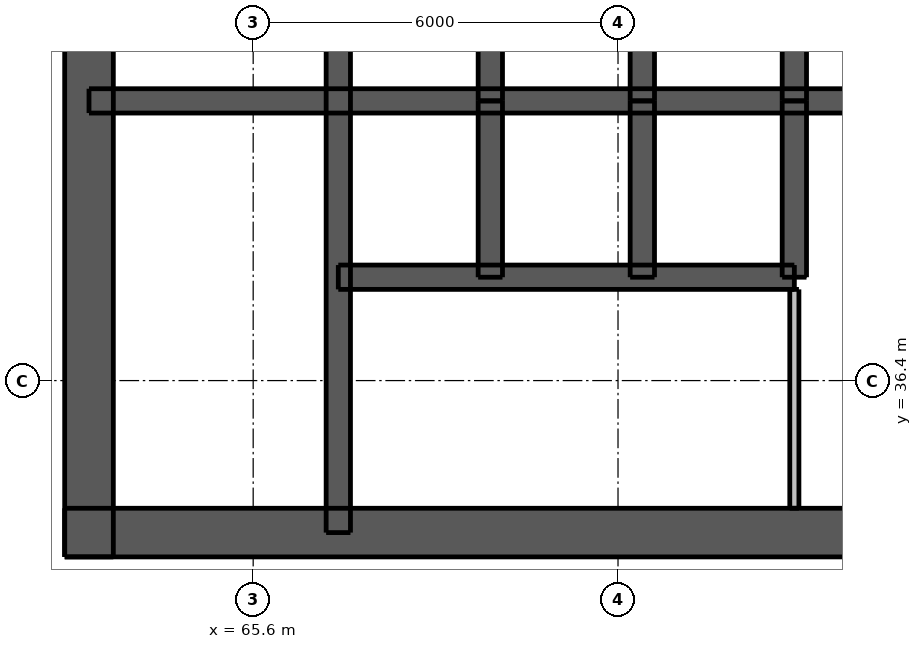
"""IFC4 building model, lengths in metres.
Left out: names, types, materials, properties, quantities, classifications, styles, units other than length and angle.
Written with IfcOpenShell. Run it as: python <this file> out.ifc"""

import sys

from ifc_helpers import new_model, si_unit, direction, frame, frame_2d, origin, place, context, subcontext, project, spatial, rectangle, extrude, element, fill, save


model = new_model("IFC4")
c1 = context("Model", 3, precision=1e-05, world=origin(), true_north=direction((0.0, 1.0)))
c2 = subcontext(c1, "Body", "Model", "MODEL_VIEW")
j1 = project(units=[si_unit("LENGTHUNIT", "METRE"), si_unit("PLANEANGLEUNIT", "RADIAN")], contexts=[c1])
p1 = place(None, origin())
s1 = spatial("IfcSite", under=j1, at=p1, CompositionType="ELEMENT")
p2 = place(p1, origin())
s2 = spatial("IfcBuilding", under=s1, at=p2, CompositionType="ELEMENT")
p3 = place(p2, frame((0.0, 0.0, 98.5)))
s3 = spatial("IfcBuildingStorey", under=s2, at=p3, CompositionType="ELEMENT", Elevation=98.5)
p4 = place(p3, frame((62.5, 33.9, 0.0), z_axis=(0.0, 0.0, 1.0), x_axis=(1.0, 0.0, 0.0)))
e1 = element("IfcWall", 1, at=p4, inside=s3, PredefinedType="SHEAR", context=c2, shape_type="SweptSolid", body=[
    extrude(rectangle(XDim=24.0, YDim=0.8, at=frame_2d((12.0, 0.0))), origin(), (0.0, 0.0, 1.0), 3.05),
])
p5 = place(p4, frame((2.0, 0.0, 0.0)))
e2 = element("IfcOpeningElement", 2, at=p5, cuts=e1, PredefinedType="OPENING", context=c2, shape_type="SweptSolid", body=[
    extrude(rectangle(XDim=1.1, YDim=2.1, at=frame_2d((0.55, 1.05))), frame((0.0, 0.41, 0.0), z_axis=(0.0, -1.0, 0.0), x_axis=(1.0, 0.0, 0.0)), (0.0, 0.0, 1.0), 0.82),
])
p6 = place(p4, frame((20.9, 0.0, 0.0)))
e3 = element("IfcOpeningElement", 3, at=p6, cuts=e1, PredefinedType="OPENING", context=c2, shape_type="SweptSolid", body=[
    extrude(rectangle(XDim=1.1, YDim=2.1, at=frame_2d((0.55, 1.05))), frame((0.0, 0.41, 0.0), z_axis=(0.0, -1.0, 0.0), x_axis=(1.0, 0.0, 0.0)), (0.0, 0.0, 1.0), 0.82),
])
p7 = place(p4, frame((8.0, 0.0, 0.0)))
e4 = element("IfcOpeningElement", 4, at=p7, cuts=e1, PredefinedType="OPENING", context=c2, shape_type="SweptSolid", body=[
    extrude(rectangle(XDim=1.1, YDim=2.1, at=frame_2d((0.55, 1.05))), frame((0.0, 0.41, 0.0), z_axis=(0.0, -1.0, 0.0), x_axis=(1.0, 0.0, 0.0)), (0.0, 0.0, 1.0), 0.82),
])
p8 = place(p4, frame((15.3, 0.0, 0.0)))
e5 = element("IfcOpeningElement", 5, at=p8, cuts=e1, PredefinedType="OPENING", context=c2, shape_type="SweptSolid", body=[
    extrude(rectangle(XDim=0.9, YDim=2.1, at=frame_2d((0.45, 1.05))), frame((0.0, 0.41, 0.0), z_axis=(0.0, -1.0, 0.0), x_axis=(1.0, 0.0, 0.0)), (0.0, 0.0, 1.0), 0.82),
])
p9 = place(p3, frame((62.9, 33.5, 0.0), z_axis=(0.0, 0.0, 1.0), x_axis=(0.0, 1.0, 0.0)))
e6 = element("IfcWall", 6, at=p9, inside=s3, PredefinedType="SHEAR", context=c2, shape_type="SweptSolid", body=[
    extrude(rectangle(XDim=24.0, YDim=0.8, at=frame_2d((12.0, 0.0))), origin(), (0.0, 0.0, 1.0), 3.05),
])
p10 = place(p9, frame((11.2, 0.0, 0.0)))
e7 = element("IfcOpeningElement", 7, at=p10, cuts=e6, PredefinedType="OPENING", context=c2, shape_type="SweptSolid", body=[
    extrude(rectangle(XDim=1.6, YDim=2.1, at=frame_2d((0.8, 1.05))), frame((0.0, 0.41, 0.0), z_axis=(0.0, -1.0, 0.0), x_axis=(1.0, 0.0, 0.0)), (0.0, 0.0, 1.0), 0.82),
])
p11 = place(p3, frame((62.9, 41.0, 0.0), z_axis=(0.0, 0.0, 1.0), x_axis=(1.0, 0.0, 0.0)))
e8 = element("IfcWall", 8, at=p11, inside=s3, PredefinedType="SHEAR", context=c2, shape_type="SweptSolid", body=[
    extrude(rectangle(XDim=23.2, YDim=0.4, at=frame_2d((11.6, 0.0))), origin(), (0.0, 0.0, 1.0), 3.05),
])
p12 = place(p3, frame((67.0, 33.9, 0.0), z_axis=(0.0, 0.0, 1.0), x_axis=(0.0, 1.0, 0.0)))
e9 = element("IfcWall", 9, at=p12, inside=s3, PredefinedType="SHEAR", context=c2, shape_type="SweptSolid", body=[
    extrude(rectangle(XDim=10.0, YDim=0.4, at=frame_2d((5.0, 0.0))), origin(), (0.0, 0.0, 1.0), 3.05),
])
p13 = place(p12, frame((0.6, 0.0, 0.0)))
e10 = element("IfcOpeningElement", 10, at=p13, cuts=e9, PredefinedType="OPENING", context=c2, shape_type="SweptSolid", body=[
    extrude(rectangle(XDim=1.1, YDim=2.1, at=frame_2d((0.55, 1.05))), frame((0.0, 0.21, 0.0), z_axis=(0.0, -1.0, 0.0), x_axis=(1.0, 0.0, 0.0)), (0.0, 0.0, 1.0), 0.42),
])
for number, where, z_axis, x_axis in (
    (11, (69.5, 41.0, 0.0), (0.0, 0.0, 1.0), (0.0, 1.0, 0.0)),
    (12, (72.0, 41.0, 0.0), (0.0, 0.0, 1.0), (0.0, 1.0, 0.0)),
    (13, (74.5, 41.0, 0.0), (0.0, 0.0, 1.0), (0.0, 1.0, 0.0)),
):
    element("IfcWall", number, at=place(p3, frame(where, z_axis=z_axis, x_axis=x_axis)), inside=s3, PredefinedType="SHEAR", context=c2, shape_type="SweptSolid", body=[
        extrude(rectangle(XDim=2.9, YDim=0.4, at=frame_2d((1.45, 0.0))), origin(), (0.0, 0.0, 1.0), 3.05),
    ])
p14 = place(p3, frame((67.0, 38.1, 0.0), z_axis=(0.0, 0.0, 1.0), x_axis=(1.0, 0.0, 0.0)))
e14 = element("IfcWall", 14, at=p14, inside=s3, PredefinedType="SHEAR", context=c2, shape_type="SweptSolid", body=[
    extrude(rectangle(XDim=7.5, YDim=0.4, at=frame_2d((3.75, 0.0))), origin(), (0.0, 0.0, 1.0), 3.05),
])
p15 = place(p14, frame((0.7, 0.0, 0.0)))
e15 = element("IfcOpeningElement", 15, at=p15, cuts=e14, PredefinedType="OPENING", context=c2, shape_type="SweptSolid", body=[
    extrude(rectangle(XDim=1.1, YDim=2.1, at=frame_2d((0.55, 1.05))), frame((0.0, 0.21, 0.0), z_axis=(0.0, -1.0, 0.0), x_axis=(1.0, 0.0, 0.0)), (0.0, 0.0, 1.0), 0.42),
])
p16 = place(p14, frame((3.2, 0.0, 0.0)))
e16 = element("IfcOpeningElement", 16, at=p16, cuts=e14, PredefinedType="OPENING", context=c2, shape_type="SweptSolid", body=[
    extrude(rectangle(XDim=1.1, YDim=2.1, at=frame_2d((0.55, 1.05))), frame((0.0, 0.21, 0.0), z_axis=(0.0, -1.0, 0.0), x_axis=(1.0, 0.0, 0.0)), (0.0, 0.0, 1.0), 0.42),
])
p17 = place(p14, frame((5.65, 0.0, 0.0)))
e17 = element("IfcOpeningElement", 17, at=p17, cuts=e14, PredefinedType="OPENING", context=c2, shape_type="SweptSolid", body=[
    extrude(rectangle(XDim=1.2, YDim=2.1, at=frame_2d((0.6, 1.05))), frame((0.0, 0.21, 0.0), z_axis=(0.0, -1.0, 0.0), x_axis=(1.0, 0.0, 0.0)), (0.0, 0.0, 1.0), 0.42),
])
for number, where, z_axis, x_axis in (
    (18, (69.5, 38.1, 0.0), (0.0, 0.0, 1.0), (0.0, 1.0, 0.0)),
    (19, (72.0, 38.1, 0.0), (0.0, 0.0, 1.0), (0.0, 1.0, 0.0)),
    (20, (74.5, 38.1, 0.0), (0.0, 0.0, 1.0), (0.0, 1.0, 0.0)),
):
    element("IfcWall", number, at=place(p3, frame(where, z_axis=z_axis, x_axis=x_axis)), inside=s3, PredefinedType="SHEAR", context=c2, shape_type="SweptSolid", body=[
        extrude(rectangle(XDim=2.9, YDim=0.4, at=frame_2d((1.45, 0.0))), origin(), (0.0, 0.0, 1.0), 3.05),
    ])
p18 = place(p3, frame((74.5, 34.3, 0.0), z_axis=(0.0, 0.0, 1.0), x_axis=(0.0, 1.0, 0.0)))
e21 = element("IfcWall", 21, at=p18, inside=s3, PredefinedType="PLUMBINGWALL", context=c2, shape_type="SweptSolid", body=[
    extrude(rectangle(XDim=3.6, YDim=0.15, at=frame_2d((1.8, 0.0))), origin(), (0.0, 0.0, 1.0), 3.05),
])
p19 = place(p5, origin())
e22 = element("IfcDoor", 22, at=p19, inside=s3, OperationType="SINGLE_SWING_LEFT", PredefinedType="DOOR", context=c2, shape_type="SweptSolid", body=[
    extrude(rectangle(XDim=1.1, YDim=2.1, at=frame_2d((0.55, 1.05))), frame((0.0, 0.388, 0.0), z_axis=(0.0, -1.0, 0.0), x_axis=(1.0, 0.0, 0.0)), (0.0, 0.0, 1.0), 0.05),
])
fill(e2, e22)
p20 = place(p7, origin())
e23 = element("IfcDoor", 23, at=p20, inside=s3, OperationType="SINGLE_SWING_LEFT", PredefinedType="DOOR", context=c2, shape_type="SweptSolid", body=[
    extrude(rectangle(XDim=1.1, YDim=2.1, at=frame_2d((0.55, 1.05))), frame((0.0, 0.388, 0.0), z_axis=(0.0, -1.0, 0.0), x_axis=(1.0, 0.0, 0.0)), (0.0, 0.0, 1.0), 0.05),
])
fill(e4, e23)
p21 = place(p13, origin())
e24 = element("IfcDoor", 24, at=p21, inside=s3, OperationType="SINGLE_SWING_RIGHT", PredefinedType="DOOR", context=c2, shape_type="SweptSolid", body=[
    extrude(rectangle(XDim=1.1, YDim=2.1, at=frame_2d((0.55, 1.05))), frame((0.0, -0.138, 0.0), z_axis=(0.0, -1.0, 0.0), x_axis=(1.0, 0.0, 0.0)), (0.0, 0.0, 1.0), 0.05),
])
fill(e10, e24)
p22 = place(p15, origin())
e25 = element("IfcDoor", 25, at=p22, inside=s3, OperationType="DOUBLE_DOOR_SLIDING", PredefinedType="DOOR", context=c2, shape_type="SweptSolid", body=[
    extrude(rectangle(XDim=1.1, YDim=2.1, at=frame_2d((0.55, 1.05))), frame((0.0, 0.025, 0.0), z_axis=(0.0, -1.0, 0.0), x_axis=(1.0, 0.0, 0.0)), (0.0, 0.0, 1.0), 0.05),
])
fill(e15, e25)
p23 = place(p16, origin())
e26 = element("IfcDoor", 26, at=p23, inside=s3, OperationType="DOUBLE_DOOR_SLIDING", PredefinedType="DOOR", context=c2, shape_type="SweptSolid", body=[
    extrude(rectangle(XDim=1.1, YDim=2.1, at=frame_2d((0.55, 1.05))), frame((0.0, 0.025, 0.0), z_axis=(0.0, -1.0, 0.0), x_axis=(1.0, 0.0, 0.0)), (0.0, 0.0, 1.0), 0.05),
])
fill(e16, e26)
p24 = place(p17, origin())
e27 = element("IfcDoor", 27, at=p24, inside=s3, OperationType="DOUBLE_DOOR_SLIDING", PredefinedType="DOOR", context=c2, shape_type="SweptSolid", body=[
    extrude(rectangle(XDim=1.2, YDim=2.1, at=frame_2d((0.6, 1.05))), frame((0.0, 0.025, 0.0), z_axis=(0.0, -1.0, 0.0), x_axis=(1.0, 0.0, 0.0)), (0.0, 0.0, 1.0), 0.05),
])
fill(e17, e27)
save(model, sys.argv[1])
